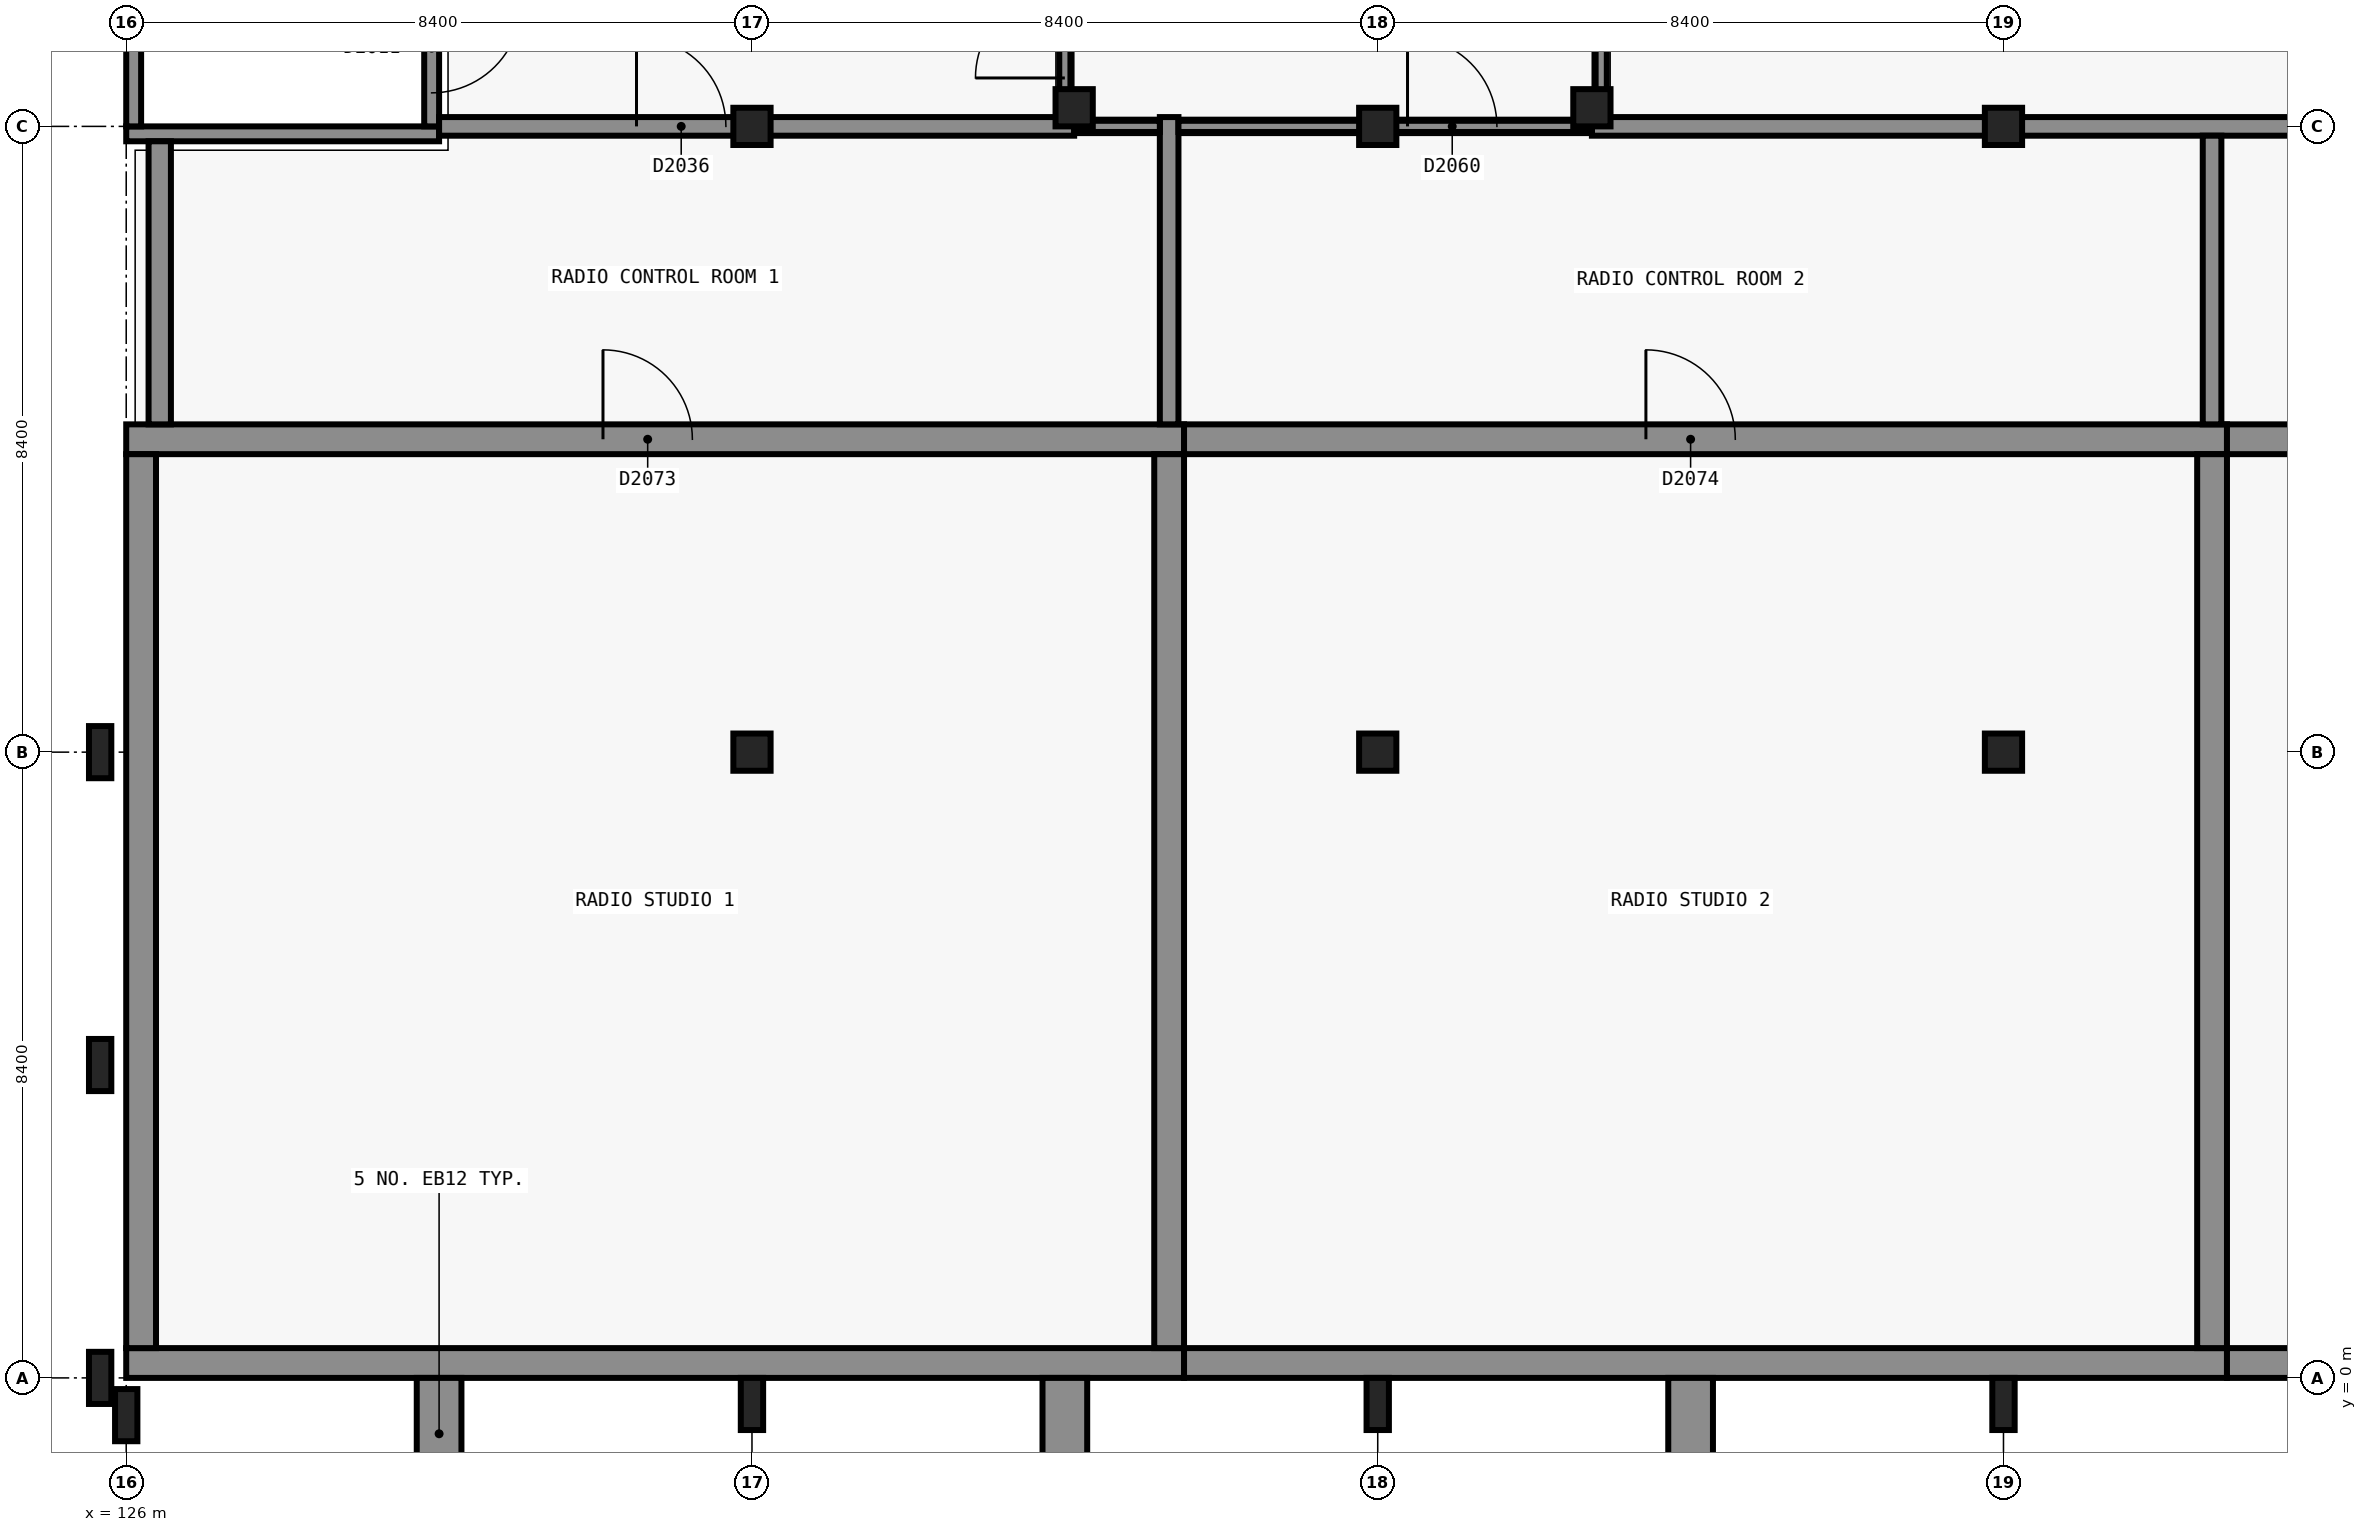
"""IFC4 building model, lengths in metres.
Left out: names, types, materials, properties, quantities, classifications, styles, units other than length and angle.
Written with IfcOpenShell. Run it as: python <this file> out.ifc"""

import sys

from ifc_helpers import new_model, si_unit, direction, frame, frame_2d, origin, origin_2d, place, context, subcontext, project, spatial, rectangle, extrude, element, fill, save


model = new_model("IFC4")
c1 = context("Model", 3, precision=1e-05, world=origin(), true_north=direction((0.0, 1.0)))
c2 = subcontext(c1, "Body", "Model", "MODEL_VIEW")
j1 = project(units=[si_unit("LENGTHUNIT", "METRE"), si_unit("PLANEANGLEUNIT", "RADIAN")], contexts=[c1])
p1 = place(None, origin())
s1 = spatial("IfcSite", under=j1, at=p1, CompositionType="ELEMENT")
p2 = place(p1, origin())
s2 = spatial("IfcBuilding", under=s1, at=p2, CompositionType="ELEMENT")
p3 = place(p2, frame((0.0, 0.0, 10.2)))
s3 = spatial("IfcBuildingStorey", under=s2, at=p3, CompositionType="ELEMENT", Elevation=10.2)
p4 = place(p3, frame((130.2, 16.7, 0.0), z_axis=(0.0, 0.0, 1.0), x_axis=(-1.0, 0.0, 0.0)))
e1 = element("IfcWall", 1, at=p4, inside=s3, PredefinedType="SHEAR", context=c2, shape_type="SweptSolid", body=[
    extrude(rectangle(XDim=4.2, YDim=0.2, at=frame_2d((2.1, 0.0))), origin(), (0.0, 0.0, 1.0), 4.8),
])
p5 = place(p3, frame((126.1, 16.8, 0.0), z_axis=(0.0, 0.0, 1.0), x_axis=(0.0, 1.0, 0.0)))
e2 = element("IfcWall", 2, at=p5, inside=s3, PredefinedType="SHEAR", context=c2, shape_type="SweptSolid", body=[
    extrude(rectangle(XDim=8.2, YDim=0.2, at=frame_2d((4.1, 0.0))), origin(), (0.0, 0.0, 1.0), 4.8),
])
p6 = place(p3, frame((130.1, 25.0, 0.0), z_axis=(0.0, 0.0, 1.0), x_axis=(0.0, -1.0, 0.0)))
e3 = element("IfcWall", 3, at=p6, inside=s3, PredefinedType="SHEAR", context=c2, shape_type="SweptSolid", body=[
    extrude(rectangle(XDim=8.2, YDim=0.2, at=frame_2d((4.1, 0.0))), origin(), (0.0, 0.0, 1.0), 4.8),
])
p7 = place(p6, frame((6.55, 0.0, 0.0)))
e4 = element("IfcOpeningElement", 4, at=p7, cuts=e3, PredefinedType="OPENING", context=c2, shape_type="SweptSolid", body=[
    extrude(rectangle(XDim=1.2, YDim=2.1, at=frame_2d((0.6, 1.05))), frame((0.0, 0.11, 0.0), z_axis=(0.0, -1.0, 0.0), x_axis=(1.0, 0.0, 0.0)), (0.0, 0.0, 1.0), 0.22),
])
p8 = place(p3, frame((140.2, 0.2, 0.0), z_axis=(0.0, 0.0, 1.0), x_axis=(-1.0, 0.0, 0.0)))
e5 = element("IfcWall", 5, at=p8, inside=s3, PredefinedType="SHEAR", context=c2, shape_type="SweptSolid", body=[
    extrude(rectangle(XDim=14.2, YDim=0.4, at=frame_2d((7.1, 0.0))), origin(), (0.0, 0.0, 1.0), 4.8),
])
p9 = place(p3, frame((126.0, 12.6, 0.0), z_axis=(0.0, 0.0, 1.0), x_axis=(1.0, 0.0, 0.0)))
e6 = element("IfcWall", 6, at=p9, inside=s3, PredefinedType="SHEAR", context=c2, shape_type="SweptSolid", body=[
    extrude(rectangle(XDim=14.2, YDim=0.4, at=frame_2d((7.1, 0.0))), origin(), (0.0, 0.0, 1.0), 4.8),
])
p10 = place(p9, frame((6.4, 0.0, 0.0)))
e7 = element("IfcOpeningElement", 7, at=p10, cuts=e6, PredefinedType="OPENING", context=c2, shape_type="SweptSolid", body=[
    extrude(rectangle(XDim=1.2, YDim=2.1, at=frame_2d((0.6, 1.05))), frame((0.0, 0.21, 0.0), z_axis=(0.0, -1.0, 0.0), x_axis=(1.0, 0.0, 0.0)), (0.0, 0.0, 1.0), 0.42),
])
for number, where, z_axis, x_axis in (
    (8, (126.2, 0.4, 0.0), (0.0, 0.0, 1.0), (0.0, 1.0, 0.0)),
    (9, (140.0, 12.4, 0.0), (0.0, 0.0, 1.0), (0.0, -1.0, 0.0)),
):
    element("IfcWall", number, at=place(p3, frame(where, z_axis=z_axis, x_axis=x_axis)), inside=s3, PredefinedType="SHEAR", context=c2, shape_type="SweptSolid", body=[
        extrude(rectangle(XDim=12.0, YDim=0.4, at=frame_2d((6.0, 0.0))), origin(), (0.0, 0.0, 1.0), 4.8),
    ])
p11 = place(p3, frame((154.2, 0.2, 0.0), z_axis=(0.0, 0.0, 1.0), x_axis=(-1.0, 0.0, 0.0)))
e10 = element("IfcWall", 10, at=p11, inside=s3, PredefinedType="SHEAR", context=c2, shape_type="SweptSolid", body=[
    extrude(rectangle(XDim=14.0, YDim=0.4, at=frame_2d((7.0, 0.0))), origin(), (0.0, 0.0, 1.0), 4.8),
])
p12 = place(p3, frame((140.2, 12.6, 0.0), z_axis=(0.0, 0.0, 1.0), x_axis=(1.0, 0.0, 0.0)))
e11 = element("IfcWall", 11, at=p12, inside=s3, PredefinedType="SHEAR", context=c2, shape_type="SweptSolid", body=[
    extrude(rectangle(XDim=14.0, YDim=0.4, at=frame_2d((7.0, 0.0))), origin(), (0.0, 0.0, 1.0), 4.8),
])
p13 = place(p12, frame((6.2, 0.0, 0.0)))
e12 = element("IfcOpeningElement", 12, at=p13, cuts=e11, PredefinedType="OPENING", context=c2, shape_type="SweptSolid", body=[
    extrude(rectangle(XDim=1.2, YDim=2.1, at=frame_2d((0.6, 1.05))), frame((0.0, 0.21, 0.0), z_axis=(0.0, -1.0, 0.0), x_axis=(1.0, 0.0, 0.0)), (0.0, 0.0, 1.0), 0.42),
])
p14 = place(p3, frame((154.0, 12.4, 0.0), z_axis=(0.0, 0.0, 1.0), x_axis=(0.0, -1.0, 0.0)))
e13 = element("IfcWall", 13, at=p14, inside=s3, PredefinedType="SHEAR", context=c2, shape_type="SweptSolid", body=[
    extrude(rectangle(XDim=12.0, YDim=0.4, at=frame_2d((6.0, 0.0))), origin(), (0.0, 0.0, 1.0), 4.8),
])
p15 = place(p3, frame((168.0, 0.2, 0.0), z_axis=(0.0, 0.0, 1.0), x_axis=(-1.0, 0.0, 0.0)))
e14 = element("IfcWall", 14, at=p15, inside=s3, PredefinedType="SHEAR", context=c2, shape_type="SweptSolid", body=[
    extrude(rectangle(XDim=13.8, YDim=0.4, at=frame_2d((6.9, 0.0))), origin(), (0.0, 0.0, 1.0), 4.8),
])
p16 = place(p3, frame((154.2, 12.6, 0.0), z_axis=(0.0, 0.0, 1.0), x_axis=(1.0, 0.0, 0.0)))
e15 = element("IfcWall", 15, at=p16, inside=s3, PredefinedType="SHEAR", context=c2, shape_type="SweptSolid", body=[
    extrude(rectangle(XDim=13.8, YDim=0.4, at=frame_2d((6.9, 0.0))), origin(), (0.0, 0.0, 1.0), 4.8),
])
p17 = place(p16, frame((6.2, 0.0, 0.0)))
e16 = element("IfcOpeningElement", 16, at=p17, cuts=e15, PredefinedType="OPENING", context=c2, shape_type="SweptSolid", body=[
    extrude(rectangle(XDim=1.2, YDim=2.1, at=frame_2d((0.6, 1.05))), frame((0.0, 0.21, 0.0), z_axis=(0.0, -1.0, 0.0), x_axis=(1.0, 0.0, 0.0)), (0.0, 0.0, 1.0), 0.42),
])
for number, where, z_axis, x_axis in (
    (17, (134.4, 8.4, 0.0), (0.0, 0.0, 1.0), (1.0, 0.0, 0.0)),
    (18, (134.4, 16.8, 0.0), (0.0, 0.0, 1.0), (1.0, 0.0, 0.0)),
    (19, (142.8, 8.4, 0.0), (0.0, 0.0, 1.0), (1.0, 0.0, 0.0)),
    (20, (142.8, 16.8, 0.0), (0.0, 0.0, 1.0), (1.0, 0.0, 0.0)),
    (21, (151.2, 8.4, 0.0), (0.0, 0.0, 1.0), (1.0, 0.0, 0.0)),
    (22, (151.2, 16.8, 0.0), (0.0, 0.0, 1.0), (1.0, 0.0, 0.0)),
    (23, (138.725, 17.05, 0.0), (0.0, 0.0, 1.0), (1.0, 0.0, 0.0)),
    (24, (145.675, 17.05, 0.0), (0.0, 0.0, 1.0), (1.0, 0.0, 0.0)),
):
    element("IfcColumn", number, at=place(p3, frame(where, z_axis=z_axis, x_axis=x_axis)), inside=s3, PredefinedType="COLUMN", context=c2, shape_type="SweptSolid", body=[
        extrude(rectangle(XDim=0.5, YDim=0.5, at=origin_2d()), origin(), (0.0, 0.0, 1.0), 4.8),
    ])
for number, where, z_axis, x_axis in (
    (25, (126.0, -0.5, 0.0), (0.0, 0.0, 1.0), (1.0, 0.0, 0.0)),
    (26, (134.4, -0.35, 0.0), (0.0, 0.0, 1.0), (1.0, 0.0, 0.0)),
    (27, (142.8, -0.35, 0.0), (0.0, 0.0, 1.0), (1.0, 0.0, 0.0)),
    (28, (151.2, -0.35, 0.0), (0.0, 0.0, 1.0), (1.0, 0.0, 0.0)),
):
    element("IfcColumn", number, at=place(p3, frame(where, z_axis=z_axis, x_axis=x_axis)), inside=s3, PredefinedType="PILASTER", context=c2, shape_type="SweptSolid", body=[
        extrude(rectangle(XDim=0.3, YDim=0.7, at=origin_2d()), origin(), (0.0, 0.0, 1.0), 4.8),
    ])
p18 = place(p3, frame((126.45, 12.8, 0.0), z_axis=(0.0, 0.0, 1.0), x_axis=(0.0, 1.0, 0.0)))
e29 = element("IfcWall", 29, at=p18, inside=s3, PredefinedType="SOLIDWALL", context=c2, shape_type="SweptSolid", body=[
    extrude(rectangle(XDim=3.8, YDim=0.3, at=frame_2d((1.9, 0.0))), origin(), (0.0, 0.0, 1.0), 4.5),
])
for number, where, z_axis, x_axis in (
    (30, (125.65, 0.0, 0.0), (0.0, 0.0, 1.0), (0.0, 1.0, 0.0)),
    (31, (125.65, 4.2, 0.0), (0.0, 0.0, 1.0), (0.0, 1.0, 0.0)),
    (32, (125.65, 8.4, 0.0), (0.0, 0.0, 1.0), (0.0, 1.0, 0.0)),
):
    element("IfcColumn", number, at=place(p3, frame(where, z_axis=z_axis, x_axis=x_axis)), inside=s3, PredefinedType="PILASTER", context=c2, shape_type="SweptSolid", body=[
        extrude(rectangle(XDim=0.3, YDim=0.7, at=origin_2d()), origin(), (0.0, 0.0, 1.0), 4.8),
    ])
for number, where, z_axis, x_axis in (
    (33, (130.2, 0.0, 0.0), (0.0, 0.0, 1.0), (0.0, -1.0, 0.0)),
    (34, (138.6, 0.0, 0.0), (0.0, 0.0, 1.0), (0.0, -1.0, 0.0)),
    (35, (147.0, 0.0, 0.0), (0.0, 0.0, 1.0), (0.0, -1.0, 0.0)),
):
    element("IfcWall", number, at=place(p3, frame(where, z_axis=z_axis, x_axis=x_axis)), inside=s3, PredefinedType="SOLIDWALL", context=c2, shape_type="SweptSolid", body=[
        extrude(rectangle(XDim=1.5, YDim=0.6, at=frame_2d((0.75, 0.0))), origin(), (0.0, 0.0, 1.0), 4.8),
    ])
p19 = place(p3, frame((130.2, 16.8, 0.0), z_axis=(0.0, 0.0, 1.0), x_axis=(1.0, 0.0, 0.0)))
e36 = element("IfcWall", 36, at=p19, inside=s3, PredefinedType="PARTITIONING", context=c2, shape_type="SweptSolid", body=[
    extrude(rectangle(XDim=8.525, YDim=0.25, at=frame_2d((4.263, 0.0))), origin(), (0.0, 0.0, 1.0), 3.8),
])
p20 = place(p19, frame((2.65, 0.0, 0.0)))
e37 = element("IfcOpeningElement", 37, at=p20, cuts=e36, PredefinedType="OPENING", context=c2, shape_type="SweptSolid", body=[
    extrude(rectangle(XDim=1.2, YDim=2.1, at=frame_2d((0.6, 1.05))), frame((0.0, 0.135, 0.0), z_axis=(0.0, -1.0, 0.0), x_axis=(1.0, 0.0, 0.0)), (0.0, 0.0, 1.0), 0.27),
])
p21 = place(p3, frame((145.675, 16.8, 0.0), z_axis=(0.0, 0.0, 1.0), x_axis=(1.0, 0.0, 0.0)))
e38 = element("IfcWall", 38, at=p21, inside=s3, PredefinedType="PARTITIONING", context=c2, shape_type="SweptSolid", body=[
    extrude(rectangle(XDim=18.125, YDim=0.25, at=frame_2d((9.062, 0.0))), origin(), (0.0, 0.0, 1.0), 3.8),
])
p22 = place(p21, frame((12.325, 0.0, 0.0)))
e39 = element("IfcOpeningElement", 39, at=p22, cuts=e38, PredefinedType="OPENING", context=c2, shape_type="SweptSolid", body=[
    extrude(rectangle(XDim=1.2, YDim=2.1, at=frame_2d((0.6, 1.05))), frame((0.0, 0.135, 0.0), z_axis=(0.0, -1.0, 0.0), x_axis=(1.0, 0.0, 0.0)), (0.0, 0.0, 1.0), 0.27),
])
p23 = place(p3, frame((140.0, 12.8, 0.0), z_axis=(0.0, 0.0, 1.0), x_axis=(0.0, 1.0, 0.0)))
e40 = element("IfcWall", 40, at=p23, inside=s3, PredefinedType="PARTITIONING", context=c2, shape_type="SweptSolid", body=[
    extrude(rectangle(XDim=4.125, YDim=0.25, at=frame_2d((2.062, 0.0))), origin(), (0.0, 0.0, 1.0), 3.8),
])
p24 = place(p3, frame((154.0, 12.8, 0.0), z_axis=(0.0, 0.0, 1.0), x_axis=(0.0, 1.0, 0.0)))
e41 = element("IfcWall", 41, at=p24, inside=s3, PredefinedType="PARTITIONING", context=c2, shape_type="SweptSolid", body=[
    extrude(rectangle(XDim=3.875, YDim=0.25, at=frame_2d((1.938, 0.0))), origin(), (0.0, 0.0, 1.0), 3.8),
])
p25 = place(p3, frame((138.725, 16.8, 0.0), z_axis=(0.0, 0.0, 1.0), x_axis=(1.0, 0.0, 0.0)))
e42 = element("IfcWall", 42, at=p25, inside=s3, PredefinedType="SOLIDWALL", context=c2, shape_type="SweptSolid", body=[
    extrude(rectangle(XDim=1.15, YDim=0.15, at=frame_2d((0.575, 0.0))), origin(), (0.0, 0.0, 1.0), 3.8),
])
p26 = place(p3, frame((140.125, 16.8, 0.0), z_axis=(0.0, 0.0, 1.0), x_axis=(1.0, 0.0, 0.0)))
e43 = element("IfcWall", 43, at=p26, inside=s3, PredefinedType="SOLIDWALL", context=c2, shape_type="SweptSolid", body=[
    extrude(rectangle(XDim=5.55, YDim=0.15, at=frame_2d((2.775, 0.0))), origin(), (0.0, 0.0, 1.0), 3.8),
])
p27 = place(p26, frame((3.075, 0.0, 0.0)))
e44 = element("IfcOpeningElement", 44, at=p27, cuts=e43, PredefinedType="OPENING", context=c2, shape_type="SweptSolid", body=[
    extrude(rectangle(XDim=1.2, YDim=2.1, at=frame_2d((0.6, 1.05))), frame((0.0, 0.085, 0.0), z_axis=(0.0, -1.0, 0.0), x_axis=(1.0, 0.0, 0.0)), (0.0, 0.0, 1.0), 0.17),
])
p28 = place(p3, frame((138.6, 16.925, 0.0), z_axis=(0.0, 0.0, 1.0), x_axis=(0.0, 1.0, 0.0)))
e45 = element("IfcWall", 45, at=p28, inside=s3, PredefinedType="SOLIDWALL", context=c2, shape_type="SweptSolid", body=[
    extrude(rectangle(XDim=2.2, YDim=0.15, at=frame_2d((1.1, 0.0))), origin(), (0.0, 0.0, 1.0), 3.8),
])
p29 = place(p28, frame((0.525, 0.0, 0.0)))
e46 = element("IfcOpeningElement", 46, at=p29, cuts=e45, PredefinedType="OPENING", context=c2, shape_type="SweptSolid", body=[
    extrude(rectangle(XDim=1.2, YDim=2.1, at=frame_2d((0.6, 1.05))), frame((0.0, 0.085, 0.0), z_axis=(0.0, -1.0, 0.0), x_axis=(1.0, 0.0, 0.0)), (0.0, 0.0, 1.0), 0.17),
])
p30 = place(p3, frame((145.8, 16.925, 0.0), z_axis=(0.0, 0.0, 1.0), x_axis=(0.0, 1.0, 0.0)))
e47 = element("IfcWall", 47, at=p30, inside=s3, PredefinedType="SOLIDWALL", context=c2, shape_type="SweptSolid", body=[
    extrude(rectangle(XDim=1.6, YDim=0.15, at=frame_2d((0.8, 0.0))), origin(), (0.0, 0.0, 1.0), 3.8),
])
p31 = place(p7, origin())
e48 = element("IfcDoor", 48, at=p31, inside=s3, OperationType="SINGLE_SWING_LEFT", PredefinedType="DOOR", context=c2, shape_type="SweptSolid", body=[
    extrude(rectangle(XDim=1.2, YDim=2.1, at=frame_2d((0.6, 1.05))), frame((0.0, 0.025, 0.0), z_axis=(0.0, -1.0, 0.0), x_axis=(1.0, 0.0, 0.0)), (0.0, 0.0, 1.0), 0.05),
])
fill(e4, e48)
p32 = place(p20, origin())
e49 = element("IfcDoor", 49, at=p32, inside=s3, OperationType="SINGLE_SWING_LEFT", PredefinedType="DOOR", context=c2, shape_type="SweptSolid", body=[
    extrude(rectangle(XDim=1.2, YDim=2.1, at=frame_2d((0.6, 1.05))), frame((0.0, 0.025, 0.0), z_axis=(0.0, -1.0, 0.0), x_axis=(1.0, 0.0, 0.0)), (0.0, 0.0, 1.0), 0.05),
])
fill(e37, e49)
p33 = place(p29, origin())
e50 = element("IfcDoor", 50, at=p33, inside=s3, OperationType="SINGLE_SWING_RIGHT", PredefinedType="DOOR", context=c2, shape_type="SweptSolid", body=[
    extrude(rectangle(XDim=1.2, YDim=2.1, at=frame_2d((0.6, 1.05))), frame((0.0, 0.025, 0.0), z_axis=(0.0, -1.0, 0.0), x_axis=(1.0, 0.0, 0.0)), (0.0, 0.0, 1.0), 0.05),
])
fill(e46, e50)
p34 = place(p27, origin())
e51 = element("IfcDoor", 51, at=p34, inside=s3, OperationType="SINGLE_SWING_RIGHT", PredefinedType="DOOR", context=c2, shape_type="SweptSolid", body=[
    extrude(rectangle(XDim=1.2, YDim=2.1, at=frame_2d((0.6, 1.05))), frame((0.0, 0.025, 0.0), z_axis=(0.0, -1.0, 0.0), x_axis=(1.0, 0.0, 0.0)), (0.0, 0.0, 1.0), 0.05),
])
fill(e44, e51)
p35 = place(p10, origin())
e52 = element("IfcDoor", 52, at=p35, inside=s3, OperationType="SINGLE_SWING_RIGHT", PredefinedType="DOOR", context=c2, shape_type="SweptSolid", body=[
    extrude(rectangle(XDim=1.2, YDim=2.1, at=frame_2d((0.6, 1.05))), frame((0.0, 0.025, 0.0), z_axis=(0.0, -1.0, 0.0), x_axis=(1.0, 0.0, 0.0)), (0.0, 0.0, 1.0), 0.05),
])
fill(e7, e52)
p36 = place(p13, origin())
e53 = element("IfcDoor", 53, at=p36, inside=s3, OperationType="SINGLE_SWING_RIGHT", PredefinedType="DOOR", context=c2, shape_type="SweptSolid", body=[
    extrude(rectangle(XDim=1.2, YDim=2.1, at=frame_2d((0.6, 1.05))), frame((0.0, 0.025, 0.0), z_axis=(0.0, -1.0, 0.0), x_axis=(1.0, 0.0, 0.0)), (0.0, 0.0, 1.0), 0.05),
])
fill(e12, e53)
save(model, sys.argv[1])
